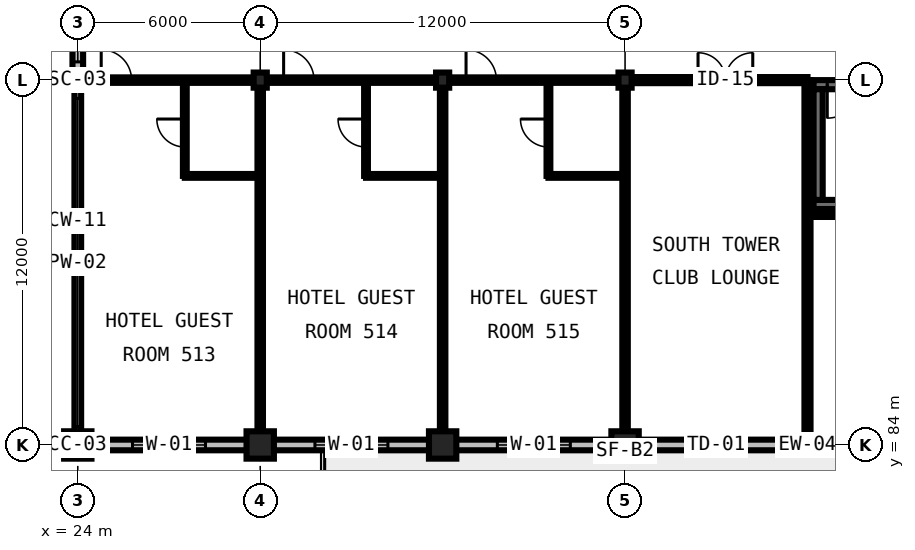
"""IFC4 building model, lengths in metres.
Left out: names, types, materials, properties, quantities, classifications, styles, units other than length and angle.
Written with IfcOpenShell. Run it as: python <this file> out.ifc"""

import sys

from ifc_helpers import new_model, si_unit, direction, frame, frame_2d, origin, origin_2d, place, context, subcontext, project, spatial, rectangle, i_section, extrude, element, fill, save


model = new_model("IFC4")
c1 = context("Model", 3, precision=1e-05, world=origin(), true_north=direction((0.0, 1.0)))
c2 = subcontext(c1, "Body", "Model", "MODEL_VIEW")
j1 = project(units=[si_unit("LENGTHUNIT", "METRE"), si_unit("PLANEANGLEUNIT", "RADIAN")], contexts=[c1])
p1 = place(None, origin())
s1 = spatial("IfcSite", under=j1, at=p1, CompositionType="ELEMENT")
p2 = place(p1, origin())
s2 = spatial("IfcBuilding", under=s1, at=p2, CompositionType="ELEMENT")
p3 = place(p2, frame((0.0, 0.0, 27.6)))
s3 = spatial("IfcBuildingStorey", under=s2, at=p3, CompositionType="ELEMENT", Elevation=27.6)
p4 = place(p3, frame((24.0, 84.0, 0.0), z_axis=(0.0, 0.0, 1.0), x_axis=(1.0, 0.0, 0.0)))
e1 = element("IfcColumn", 1, at=p4, inside=s3, PredefinedType="COLUMN", context=c2, shape_type="SweptSolid", body=[
    extrude(rectangle(XDim=0.9, YDim=0.9, at=origin_2d()), origin(), (0.0, 0.0, 1.0), 3.6),
])
p5 = place(p3, frame((24.0, 96.0, 0.0), z_axis=(0.0, 0.0, 1.0), x_axis=(1.0, 0.0, 0.0)))
e2 = element("IfcColumn", 2, at=p5, inside=s3, PredefinedType="COLUMN", context=c2, shape_type="SweptSolid", body=[
    extrude(i_section(OverallWidth=0.432, OverallDepth=0.498, WebThickness=0.056, FlangeThickness=0.089, FilletRadius=0.031, at=origin_2d()), origin(), (0.0, 0.0, 1.0), 3.6),
])
p6 = place(p3, frame((30.0, 84.0, 0.0), z_axis=(0.0, 0.0, 1.0), x_axis=(1.0, 0.0, 0.0)))
e3 = element("IfcColumn", 3, at=p6, inside=s3, PredefinedType="COLUMN", context=c2, shape_type="SweptSolid", body=[
    extrude(rectangle(XDim=0.9, YDim=0.9, at=origin_2d()), origin(), (0.0, 0.0, 1.0), 3.6),
])
p7 = place(p3, frame((30.0, 96.0, 0.0), z_axis=(0.0, 0.0, 1.0), x_axis=(1.0, 0.0, 0.0)))
e4 = element("IfcColumn", 4, at=p7, inside=s3, PredefinedType="COLUMN", context=c2, shape_type="SweptSolid", body=[
    extrude(i_section(OverallWidth=0.432, OverallDepth=0.498, WebThickness=0.056, FlangeThickness=0.089, FilletRadius=0.031, at=origin_2d()), origin(), (0.0, 0.0, 1.0), 3.6),
])
p8 = place(p3, frame((36.0, 84.0, 0.0), z_axis=(0.0, 0.0, 1.0), x_axis=(1.0, 0.0, 0.0)))
e5 = element("IfcColumn", 5, at=p8, inside=s3, PredefinedType="COLUMN", context=c2, shape_type="SweptSolid", body=[
    extrude(rectangle(XDim=0.9, YDim=0.9, at=origin_2d()), origin(), (0.0, 0.0, 1.0), 3.6),
])
p9 = place(p3, frame((36.0, 96.0, 0.0), z_axis=(0.0, 0.0, 1.0), x_axis=(1.0, 0.0, 0.0)))
e6 = element("IfcColumn", 6, at=p9, inside=s3, PredefinedType="COLUMN", context=c2, shape_type="SweptSolid", body=[
    extrude(i_section(OverallWidth=0.432, OverallDepth=0.498, WebThickness=0.056, FlangeThickness=0.089, FilletRadius=0.031, at=origin_2d()), origin(), (0.0, 0.0, 1.0), 3.6),
])
p10 = place(p3, frame((42.0, 84.0, 0.0), z_axis=(0.0, 0.0, 1.0), x_axis=(1.0, 0.0, 0.0)))
e7 = element("IfcColumn", 7, at=p10, inside=s3, PredefinedType="COLUMN", context=c2, shape_type="SweptSolid", body=[
    extrude(rectangle(XDim=0.9, YDim=0.9, at=origin_2d()), origin(), (0.0, 0.0, 1.0), 3.6),
])
p11 = place(p3, frame((42.0, 96.0, 0.0), z_axis=(0.0, 0.0, 1.0), x_axis=(1.0, 0.0, 0.0)))
e8 = element("IfcColumn", 8, at=p11, inside=s3, PredefinedType="COLUMN", context=c2, shape_type="SweptSolid", body=[
    extrude(i_section(OverallWidth=0.432, OverallDepth=0.498, WebThickness=0.056, FlangeThickness=0.089, FilletRadius=0.031, at=origin_2d()), origin(), (0.0, 0.0, 1.0), 3.6),
])
p12 = place(p3, frame((48.2, 91.91, 0.0), z_axis=(0.0, 0.0, 1.0), x_axis=(1.0, 0.0, 0.0)))
e9 = element("IfcWall", 9, at=p12, inside=s3, PredefinedType="SHEAR", context=c2, shape_type="SweptSolid", body=[
    extrude(rectangle(XDim=9.8, YDim=0.3, at=frame_2d((4.9, 0.0))), origin(), (0.0, 0.0, 1.0), 3.6),
])
p13 = place(p3, frame((58.0, 95.85, 0.0), z_axis=(0.0, 0.0, 1.0), x_axis=(-1.0, 0.0, 0.0)))
e10 = element("IfcWall", 10, at=p13, inside=s3, PredefinedType="SHEAR", context=c2, shape_type="SweptSolid", body=[
    extrude(rectangle(XDim=9.8, YDim=0.3, at=frame_2d((4.9, 0.0))), origin(), (0.0, 0.0, 1.0), 3.6),
])
p14 = place(p13, frame((8.25, 0.0, 0.0)))
e11 = element("IfcOpeningElement", 11, at=p14, cuts=e10, PredefinedType="OPENING", context=c2, shape_type="SweptSolid", body=[
    extrude(rectangle(XDim=1.1, YDim=2.2, at=frame_2d((0.55, 1.1))), frame((0.0, 0.165, 0.0), z_axis=(0.0, -1.0, 0.0), x_axis=(1.0, 0.0, 0.0)), (0.0, 0.0, 1.0), 0.33),
])
p15 = place(p3, frame((48.35, 95.7, 0.0), z_axis=(0.0, 0.0, 1.0), x_axis=(0.0, -1.0, 0.0)))
e12 = element("IfcWall", 12, at=p15, inside=s3, PredefinedType="SHEAR", context=c2, shape_type="SweptSolid", body=[
    extrude(rectangle(XDim=3.64, YDim=0.3, at=frame_2d((1.82, 0.0))), origin(), (0.0, 0.0, 1.0), 3.6),
])
p16 = place(p3, frame((24.0, 84.0, 0.0), z_axis=(0.0, 0.0, 1.0), x_axis=(1.0, 0.0, 0.0)))
e13 = element("IfcWall", 13, at=p16, inside=s3, PredefinedType="STANDARD", context=c2, shape_type="SweptSolid", body=[
    extrude(rectangle(XDim=6.0, YDim=0.35, at=frame_2d((3.0, 0.0))), origin(), (0.0, 0.0, 1.0), 2.486),
])
p17 = place(p16, frame((1.8, 0.0, 0.75)))
e14 = element("IfcOpeningElement", 14, at=p17, cuts=e13, PredefinedType="OPENING", context=c2, shape_type="SweptSolid", body=[
    extrude(rectangle(XDim=2.4, YDim=1.65, at=frame_2d((1.2, 0.825))), frame((0.0, 0.19, 0.0), z_axis=(0.0, -1.0, 0.0), x_axis=(1.0, 0.0, 0.0)), (0.0, 0.0, 1.0), 0.38),
])
p18 = place(p3, frame((30.0, 84.0, 0.0), z_axis=(0.0, 0.0, 1.0), x_axis=(1.0, 0.0, 0.0)))
e15 = element("IfcWall", 15, at=p18, inside=s3, PredefinedType="STANDARD", context=c2, shape_type="SweptSolid", body=[
    extrude(rectangle(XDim=6.0, YDim=0.35, at=frame_2d((3.0, 0.0))), origin(), (0.0, 0.0, 1.0), 2.486),
])
p19 = place(p18, frame((1.8, 0.0, 0.75)))
e16 = element("IfcOpeningElement", 16, at=p19, cuts=e15, PredefinedType="OPENING", context=c2, shape_type="SweptSolid", body=[
    extrude(rectangle(XDim=2.4, YDim=1.65, at=frame_2d((1.2, 0.825))), frame((0.0, 0.19, 0.0), z_axis=(0.0, -1.0, 0.0), x_axis=(1.0, 0.0, 0.0)), (0.0, 0.0, 1.0), 0.38),
])
p20 = place(p3, frame((36.0, 84.0, 0.0), z_axis=(0.0, 0.0, 1.0), x_axis=(1.0, 0.0, 0.0)))
e17 = element("IfcWall", 17, at=p20, inside=s3, PredefinedType="STANDARD", context=c2, shape_type="SweptSolid", body=[
    extrude(rectangle(XDim=6.0, YDim=0.35, at=frame_2d((3.0, 0.0))), origin(), (0.0, 0.0, 1.0), 2.486),
])
p21 = place(p20, frame((1.8, 0.0, 0.75)))
e18 = element("IfcOpeningElement", 18, at=p21, cuts=e17, PredefinedType="OPENING", context=c2, shape_type="SweptSolid", body=[
    extrude(rectangle(XDim=2.4, YDim=1.65, at=frame_2d((1.2, 0.825))), frame((0.0, 0.19, 0.0), z_axis=(0.0, -1.0, 0.0), x_axis=(1.0, 0.0, 0.0)), (0.0, 0.0, 1.0), 0.38),
])
p22 = place(p3, frame((42.0, 84.0, 0.0), z_axis=(0.0, 0.0, 1.0), x_axis=(1.0, 0.0, 0.0)))
e19 = element("IfcWall", 19, at=p22, inside=s3, PredefinedType="STANDARD", context=c2, shape_type="SweptSolid", body=[
    extrude(rectangle(XDim=12.0, YDim=0.35, at=frame_2d((6.0, 0.0))), origin(), (0.0, 0.0, 1.0), 2.486),
])
p23 = place(p22, frame((2.1, 0.0, 0.0)))
e20 = element("IfcOpeningElement", 20, at=p23, cuts=e19, PredefinedType="OPENING", context=c2, shape_type="SweptSolid", body=[
    extrude(rectangle(XDim=1.8, YDim=2.2, at=frame_2d((0.9, 1.1))), frame((0.0, 0.19, 0.0), z_axis=(0.0, -1.0, 0.0), x_axis=(1.0, 0.0, 0.0)), (0.0, 0.0, 1.0), 0.38),
])
p24 = place(p22, frame((7.725, 0.0, 0.75)))
e21 = element("IfcOpeningElement", 21, at=p24, cuts=e19, PredefinedType="OPENING", context=c2, shape_type="SweptSolid", body=[
    extrude(rectangle(XDim=2.55, YDim=1.65, at=frame_2d((1.275, 0.825))), frame((0.0, 0.19, 0.0), z_axis=(0.0, -1.0, 0.0), x_axis=(1.0, 0.0, 0.0)), (0.0, 0.0, 1.0), 0.38),
])
p25 = place(p3, frame((24.0, 96.0, 0.0), z_axis=(0.0, 0.0, 1.0), x_axis=(0.0, -1.0, 0.0)))
e22 = element("IfcWall", 22, at=p25, inside=s3, PredefinedType="PARAPET", context=c2, shape_type="SweptSolid", body=[
    extrude(rectangle(XDim=12.0, YDim=0.22, at=frame_2d((6.0, 0.0))), origin(), (0.0, 0.0, 1.0), 0.2),
])
p26 = place(p3, frame((24.0, 105.0, 0.0), z_axis=(0.0, 0.0, 1.0), x_axis=(0.0, -1.0, 0.0)))
e23 = element("IfcWall", 23, at=p26, inside=s3, PredefinedType="STANDARD", context=c2, shape_type="SweptSolid", body=[
    extrude(rectangle(XDim=9.0, YDim=0.35, at=frame_2d((4.5, 0.0))), origin(), (0.0, 0.0, 1.0), 2.981),
])
p27 = place(p26, frame((6.6, 0.0, 0.85)))
e24 = element("IfcOpeningElement", 24, at=p27, cuts=e23, PredefinedType="OPENING", context=c2, shape_type="SweptSolid", body=[
    extrude(rectangle(XDim=1.8, YDim=1.5, at=frame_2d((0.9, 0.75))), frame((0.0, 0.19, 0.0), z_axis=(0.0, -1.0, 0.0), x_axis=(1.0, 0.0, 0.0)), (0.0, 0.0, 1.0), 0.38),
])
p28 = place(p3, frame((48.0, 91.6, 0.0), z_axis=(0.0, 0.0, 1.0), x_axis=(1.0, 0.0, 0.0)))
e25 = element("IfcWall", 25, at=p28, inside=s3, PredefinedType="PARTITIONING", context=c2, shape_type="SweptSolid", body=[
    extrude(rectangle(XDim=10.4, YDim=0.2, at=frame_2d((5.2, 0.0))), origin(), (0.0, 0.0, 1.0), 3.29),
])
p29 = place(p3, frame((48.0, 84.175, 0.0), z_axis=(0.0, 0.0, 1.0), x_axis=(0.0, 1.0, 0.0)))
e26 = element("IfcWall", 26, at=p29, inside=s3, PredefinedType="PARTITIONING", context=c2, shape_type="SweptSolid", body=[
    extrude(rectangle(XDim=11.825, YDim=0.2, at=frame_2d((5.913, 0.0))), origin(), (0.0, 0.0, 1.0), 3.29),
])
p30 = place(p3, frame((42.0, 96.0, 0.0), z_axis=(0.0, 0.0, 1.0), x_axis=(1.0, 0.0, 0.0)))
e27 = element("IfcWall", 27, at=p30, inside=s3, PredefinedType="PARTITIONING", context=c2, shape_type="SweptSolid", body=[
    extrude(rectangle(XDim=6.0, YDim=0.2, at=frame_2d((3.0, 0.0))), origin(), (0.0, 0.0, 1.0), 2.359),
])
p31 = place(p30, frame((2.4, 0.0, 0.0)))
e28 = element("IfcOpeningElement", 28, at=p31, cuts=e27, PredefinedType="OPENING", context=c2, shape_type="SweptSolid", body=[
    extrude(rectangle(XDim=1.8, YDim=2.3, at=frame_2d((0.9, 1.15))), frame((0.0, 0.115, 0.0), z_axis=(0.0, -1.0, 0.0), x_axis=(1.0, 0.0, 0.0)), (0.0, 0.0, 1.0), 0.23),
])
p32 = place(p3, frame((42.0, 84.175, 0.0), z_axis=(0.0, 0.0, 1.0), x_axis=(0.0, 1.0, 0.0)))
e29 = element("IfcWall", 29, at=p32, inside=s3, PredefinedType="PARTITIONING", context=c2, shape_type="SweptSolid", body=[
    extrude(rectangle(XDim=11.825, YDim=0.18, at=frame_2d((5.913, 0.0))), origin(), (0.0, 0.0, 1.0), 2.59),
])
p33 = place(p3, frame((24.085, 96.0, 0.0), z_axis=(0.0, 0.0, 1.0), x_axis=(1.0, 0.0, 0.0)))
e30 = element("IfcWall", 30, at=p33, inside=s3, PredefinedType="PARTITIONING", context=c2, shape_type="SweptSolid", body=[
    extrude(rectangle(XDim=5.915, YDim=0.18, at=frame_2d((2.957, 0.0))), origin(), (0.0, 0.0, 1.0), 2.736),
])
p34 = place(p33, frame((0.685, 0.0, 0.0)))
e31 = element("IfcOpeningElement", 31, at=p34, cuts=e30, PredefinedType="OPENING", context=c2, shape_type="SweptSolid", body=[
    extrude(rectangle(XDim=1.0, YDim=2.15, at=frame_2d((0.5, 1.075))), frame((0.0, 0.105, 0.0), z_axis=(0.0, -1.0, 0.0), x_axis=(1.0, 0.0, 0.0)), (0.0, 0.0, 1.0), 0.21),
])
p35 = place(p3, frame((30.0, 84.175, 0.0), z_axis=(0.0, 0.0, 1.0), x_axis=(0.0, 1.0, 0.0)))
e32 = element("IfcWall", 32, at=p35, inside=s3, PredefinedType="PARTITIONING", context=c2, shape_type="SweptSolid", body=[
    extrude(rectangle(XDim=11.825, YDim=0.18, at=frame_2d((5.913, 0.0))), origin(), (0.0, 0.0, 1.0), 2.59),
])
p36 = place(p3, frame((27.52, 92.85, 0.0), z_axis=(0.0, 0.0, 1.0), x_axis=(0.0, 1.0, 0.0)))
e33 = element("IfcWall", 33, at=p36, inside=s3, PredefinedType="PARTITIONING", context=c2, shape_type="SweptSolid", body=[
    extrude(rectangle(XDim=3.06, YDim=0.125, at=frame_2d((1.53, 0.0))), origin(), (0.0, 0.0, 1.0), 3.29),
])
p37 = place(p36, frame((0.95, 0.0, 0.0)))
e34 = element("IfcOpeningElement", 34, at=p37, cuts=e33, PredefinedType="OPENING", context=c2, shape_type="SweptSolid", body=[
    extrude(rectangle(XDim=0.92, YDim=2.1, at=frame_2d((0.46, 1.05))), frame((0.0, 0.077, 0.0), z_axis=(0.0, -1.0, 0.0), x_axis=(1.0, 0.0, 0.0)), (0.0, 0.0, 1.0), 0.155),
])
p38 = place(p3, frame((27.52, 92.85, 0.0), z_axis=(0.0, 0.0, 1.0), x_axis=(1.0, 0.0, 0.0)))
e35 = element("IfcWall", 35, at=p38, inside=s3, PredefinedType="PARTITIONING", context=c2, shape_type="SweptSolid", body=[
    extrude(rectangle(XDim=2.48, YDim=0.125, at=frame_2d((1.24, 0.0))), origin(), (0.0, 0.0, 1.0), 3.29),
])
p39 = place(p3, frame((30.0, 96.0, 0.0), z_axis=(0.0, 0.0, 1.0), x_axis=(1.0, 0.0, 0.0)))
e36 = element("IfcWall", 36, at=p39, inside=s3, PredefinedType="PARTITIONING", context=c2, shape_type="SweptSolid", body=[
    extrude(rectangle(XDim=6.0, YDim=0.18, at=frame_2d((3.0, 0.0))), origin(), (0.0, 0.0, 1.0), 2.736),
])
p40 = place(p39, frame((0.77, 0.0, 0.0)))
e37 = element("IfcOpeningElement", 37, at=p40, cuts=e36, PredefinedType="OPENING", context=c2, shape_type="SweptSolid", body=[
    extrude(rectangle(XDim=1.0, YDim=2.15, at=frame_2d((0.5, 1.075))), frame((0.0, 0.105, 0.0), z_axis=(0.0, -1.0, 0.0), x_axis=(1.0, 0.0, 0.0)), (0.0, 0.0, 1.0), 0.21),
])
p41 = place(p3, frame((36.0, 84.175, 0.0), z_axis=(0.0, 0.0, 1.0), x_axis=(0.0, 1.0, 0.0)))
e38 = element("IfcWall", 38, at=p41, inside=s3, PredefinedType="PARTITIONING", context=c2, shape_type="SweptSolid", body=[
    extrude(rectangle(XDim=11.825, YDim=0.18, at=frame_2d((5.913, 0.0))), origin(), (0.0, 0.0, 1.0), 2.59),
])
p42 = place(p3, frame((33.48, 92.85, 0.0), z_axis=(0.0, 0.0, 1.0), x_axis=(0.0, 1.0, 0.0)))
e39 = element("IfcWall", 39, at=p42, inside=s3, PredefinedType="PARTITIONING", context=c2, shape_type="SweptSolid", body=[
    extrude(rectangle(XDim=3.06, YDim=0.125, at=frame_2d((1.53, 0.0))), origin(), (0.0, 0.0, 1.0), 3.29),
])
p43 = place(p42, frame((0.95, 0.0, 0.0)))
e40 = element("IfcOpeningElement", 40, at=p43, cuts=e39, PredefinedType="OPENING", context=c2, shape_type="SweptSolid", body=[
    extrude(rectangle(XDim=0.92, YDim=2.1, at=frame_2d((0.46, 1.05))), frame((0.0, 0.077, 0.0), z_axis=(0.0, -1.0, 0.0), x_axis=(1.0, 0.0, 0.0)), (0.0, 0.0, 1.0), 0.155),
])
p44 = place(p3, frame((33.48, 92.85, 0.0), z_axis=(0.0, 0.0, 1.0), x_axis=(1.0, 0.0, 0.0)))
e41 = element("IfcWall", 41, at=p44, inside=s3, PredefinedType="PARTITIONING", context=c2, shape_type="SweptSolid", body=[
    extrude(rectangle(XDim=2.52, YDim=0.125, at=frame_2d((1.26, 0.0))), origin(), (0.0, 0.0, 1.0), 3.29),
])
p45 = place(p3, frame((36.0, 96.0, 0.0), z_axis=(0.0, 0.0, 1.0), x_axis=(1.0, 0.0, 0.0)))
e42 = element("IfcWall", 42, at=p45, inside=s3, PredefinedType="PARTITIONING", context=c2, shape_type="SweptSolid", body=[
    extrude(rectangle(XDim=6.0, YDim=0.18, at=frame_2d((3.0, 0.0))), origin(), (0.0, 0.0, 1.0), 2.736),
])
p46 = place(p45, frame((0.77, 0.0, 0.0)))
e43 = element("IfcOpeningElement", 43, at=p46, cuts=e42, PredefinedType="OPENING", context=c2, shape_type="SweptSolid", body=[
    extrude(rectangle(XDim=1.0, YDim=2.15, at=frame_2d((0.5, 1.075))), frame((0.0, 0.105, 0.0), z_axis=(0.0, -1.0, 0.0), x_axis=(1.0, 0.0, 0.0)), (0.0, 0.0, 1.0), 0.21),
])
p47 = place(p3, frame((39.48, 92.85, 0.0), z_axis=(0.0, 0.0, 1.0), x_axis=(0.0, 1.0, 0.0)))
e44 = element("IfcWall", 44, at=p47, inside=s3, PredefinedType="PARTITIONING", context=c2, shape_type="SweptSolid", body=[
    extrude(rectangle(XDim=3.06, YDim=0.125, at=frame_2d((1.53, 0.0))), origin(), (0.0, 0.0, 1.0), 3.29),
])
p48 = place(p47, frame((0.95, 0.0, 0.0)))
e45 = element("IfcOpeningElement", 45, at=p48, cuts=e44, PredefinedType="OPENING", context=c2, shape_type="SweptSolid", body=[
    extrude(rectangle(XDim=0.92, YDim=2.1, at=frame_2d((0.46, 1.05))), frame((0.0, 0.077, 0.0), z_axis=(0.0, -1.0, 0.0), x_axis=(1.0, 0.0, 0.0)), (0.0, 0.0, 1.0), 0.155),
])
p49 = place(p3, frame((39.48, 92.85, 0.0), z_axis=(0.0, 0.0, 1.0), x_axis=(1.0, 0.0, 0.0)))
e46 = element("IfcWall", 46, at=p49, inside=s3, PredefinedType="PARTITIONING", context=c2, shape_type="SweptSolid", body=[
    extrude(rectangle(XDim=2.52, YDim=0.125, at=frame_2d((1.26, 0.0))), origin(), (0.0, 0.0, 1.0), 3.29),
])
p50 = place(p14, origin())
e47 = element("IfcDoor", 47, at=p50, inside=s3, OperationType="SINGLE_SWING_RIGHT", PredefinedType="DOOR", context=c2, shape_type="SweptSolid", body=[
    extrude(rectangle(XDim=1.1, YDim=2.2, at=frame_2d((0.55, 1.1))), frame((0.0, 0.025, 0.0), z_axis=(0.0, -1.0, 0.0), x_axis=(1.0, 0.0, 0.0)), (0.0, 0.0, 1.0), 0.05),
])
fill(e11, e47)
p51 = place(p17, origin())
e48 = element("IfcWindow", 48, at=p51, inside=s3, PartitioningType="DOUBLE_PANEL_VERTICAL", PredefinedType="WINDOW", context=c2, shape_type="SweptSolid", body=[
    extrude(rectangle(XDim=2.4, YDim=1.65, at=frame_2d((1.2, 0.825))), frame((0.0, 0.03, 0.0), z_axis=(0.0, -1.0, 0.0), x_axis=(1.0, 0.0, 0.0)), (0.0, 0.0, 1.0), 0.06),
])
fill(e14, e48)
p52 = place(p19, origin())
e49 = element("IfcWindow", 49, at=p52, inside=s3, PartitioningType="DOUBLE_PANEL_VERTICAL", PredefinedType="WINDOW", context=c2, shape_type="SweptSolid", body=[
    extrude(rectangle(XDim=2.4, YDim=1.65, at=frame_2d((1.2, 0.825))), frame((0.0, 0.03, 0.0), z_axis=(0.0, -1.0, 0.0), x_axis=(1.0, 0.0, 0.0)), (0.0, 0.0, 1.0), 0.06),
])
fill(e16, e49)
p53 = place(p21, origin())
e50 = element("IfcWindow", 50, at=p53, inside=s3, PartitioningType="DOUBLE_PANEL_VERTICAL", PredefinedType="WINDOW", context=c2, shape_type="SweptSolid", body=[
    extrude(rectangle(XDim=2.4, YDim=1.65, at=frame_2d((1.2, 0.825))), frame((0.0, 0.03, 0.0), z_axis=(0.0, -1.0, 0.0), x_axis=(1.0, 0.0, 0.0)), (0.0, 0.0, 1.0), 0.06),
])
fill(e18, e50)
p54 = place(p23, origin())
e51 = element("IfcDoor", 51, at=p54, inside=s3, OperationType="DOUBLE_DOOR_SLIDING", PredefinedType="DOOR", context=c2, shape_type="SweptSolid", body=[
    extrude(rectangle(XDim=1.8, YDim=2.2, at=frame_2d((0.9, 1.1))), frame((0.0, 0.025, 0.0), z_axis=(0.0, -1.0, 0.0), x_axis=(1.0, 0.0, 0.0)), (0.0, 0.0, 1.0), 0.05),
])
fill(e20, e51)
p55 = place(p27, origin())
e52 = element("IfcWindow", 52, at=p55, inside=s3, PartitioningType="SINGLE_PANEL", PredefinedType="WINDOW", context=c2, shape_type="SweptSolid", body=[
    extrude(rectangle(XDim=1.8, YDim=1.5, at=frame_2d((0.9, 0.75))), frame((0.0, 0.03, 0.0), z_axis=(0.0, -1.0, 0.0), x_axis=(1.0, 0.0, 0.0)), (0.0, 0.0, 1.0), 0.06),
])
fill(e24, e52)
p56 = place(p31, origin())
e53 = element("IfcDoor", 53, at=p56, inside=s3, OperationType="DOUBLE_DOOR_SINGLE_SWING", PredefinedType="DOOR", context=c2, shape_type="SweptSolid", body=[
    extrude(rectangle(XDim=1.8, YDim=2.3, at=frame_2d((0.9, 1.15))), frame((0.0, 0.025, 0.0), z_axis=(0.0, -1.0, 0.0), x_axis=(1.0, 0.0, 0.0)), (0.0, 0.0, 1.0), 0.05),
])
fill(e28, e53)
p57 = place(p34, origin())
e54 = element("IfcDoor", 54, at=p57, inside=s3, OperationType="SINGLE_SWING_LEFT", PredefinedType="DOOR", context=c2, shape_type="SweptSolid", body=[
    extrude(rectangle(XDim=1.0, YDim=2.15, at=frame_2d((0.5, 1.075))), frame((0.0, 0.025, 0.0), z_axis=(0.0, -1.0, 0.0), x_axis=(1.0, 0.0, 0.0)), (0.0, 0.0, 1.0), 0.05),
])
fill(e31, e54)
p58 = place(p37, origin())
e55 = element("IfcDoor", 55, at=p58, inside=s3, OperationType="SINGLE_SWING_RIGHT", PredefinedType="DOOR", context=c2, shape_type="SweptSolid", body=[
    extrude(rectangle(XDim=0.92, YDim=2.1, at=frame_2d((0.46, 1.05))), frame((0.0, 0.025, 0.0), z_axis=(0.0, -1.0, 0.0), x_axis=(1.0, 0.0, 0.0)), (0.0, 0.0, 1.0), 0.05),
])
fill(e34, e55)
p59 = place(p40, origin())
e56 = element("IfcDoor", 56, at=p59, inside=s3, OperationType="SINGLE_SWING_LEFT", PredefinedType="DOOR", context=c2, shape_type="SweptSolid", body=[
    extrude(rectangle(XDim=1.0, YDim=2.15, at=frame_2d((0.5, 1.075))), frame((0.0, 0.025, 0.0), z_axis=(0.0, -1.0, 0.0), x_axis=(1.0, 0.0, 0.0)), (0.0, 0.0, 1.0), 0.05),
])
fill(e37, e56)
p60 = place(p43, origin())
e57 = element("IfcDoor", 57, at=p60, inside=s3, OperationType="SINGLE_SWING_RIGHT", PredefinedType="DOOR", context=c2, shape_type="SweptSolid", body=[
    extrude(rectangle(XDim=0.92, YDim=2.1, at=frame_2d((0.46, 1.05))), frame((0.0, 0.025, 0.0), z_axis=(0.0, -1.0, 0.0), x_axis=(1.0, 0.0, 0.0)), (0.0, 0.0, 1.0), 0.05),
])
fill(e40, e57)
p61 = place(p46, origin())
e58 = element("IfcDoor", 58, at=p61, inside=s3, OperationType="SINGLE_SWING_LEFT", PredefinedType="DOOR", context=c2, shape_type="SweptSolid", body=[
    extrude(rectangle(XDim=1.0, YDim=2.15, at=frame_2d((0.5, 1.075))), frame((0.0, 0.025, 0.0), z_axis=(0.0, -1.0, 0.0), x_axis=(1.0, 0.0, 0.0)), (0.0, 0.0, 1.0), 0.05),
])
fill(e43, e58)
p62 = place(p48, origin())
e59 = element("IfcDoor", 59, at=p62, inside=s3, OperationType="SINGLE_SWING_RIGHT", PredefinedType="DOOR", context=c2, shape_type="SweptSolid", body=[
    extrude(rectangle(XDim=0.92, YDim=2.1, at=frame_2d((0.46, 1.05))), frame((0.0, 0.025, 0.0), z_axis=(0.0, -1.0, 0.0), x_axis=(1.0, 0.0, 0.0)), (0.0, 0.0, 1.0), 0.05),
])
fill(e45, e59)
save(model, sys.argv[1])
